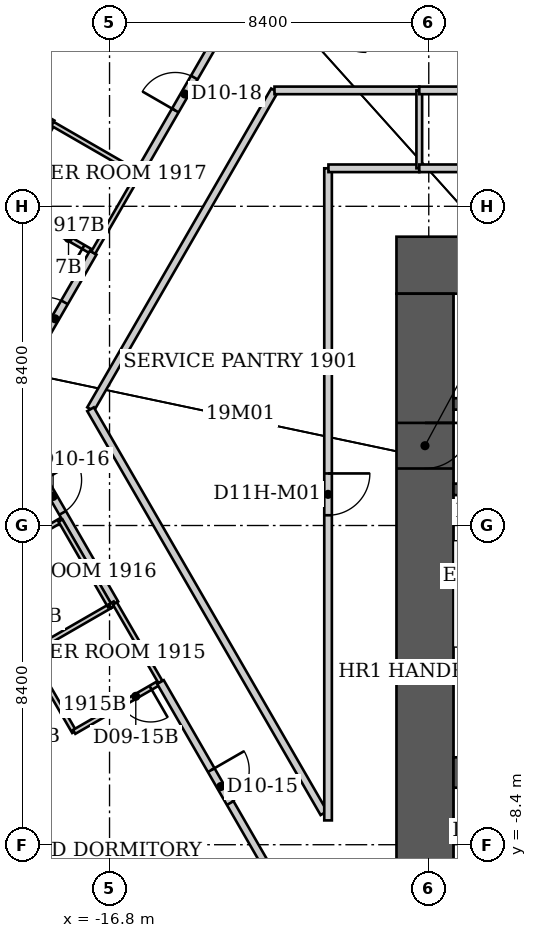
"""IFC4 building model, lengths in metres.
Left out: names, types, materials, properties, quantities, classifications, styles, units other than length and angle.
Written with IfcOpenShell. Run it as: python <this file> out.ifc"""

import sys

from ifc_helpers import new_model, si_unit, direction, frame, frame_2d, origin, origin_2d, place, context, subcontext, project, spatial, rectangle, extrude, element, fill, save


model = new_model("IFC4")
c1 = context("Model", 3, precision=1e-05, world=origin(), true_north=direction((0.0, 1.0)))
c2 = subcontext(c1, "Body", "Model", "MODEL_VIEW")
j1 = project(units=[si_unit("LENGTHUNIT", "METRE"), si_unit("PLANEANGLEUNIT", "RADIAN")], contexts=[c1])
p1 = place(None, origin())
s1 = spatial("IfcSite", under=j1, at=p1, CompositionType="ELEMENT")
p2 = place(p1, origin())
s2 = spatial("IfcBuilding", under=s1, at=p2, CompositionType="ELEMENT")
p3 = place(p2, frame((0.0, 0.0, 80.0)))
s3 = spatial("IfcBuildingStorey", under=s2, at=p3, CompositionType="ELEMENT", Elevation=80.0)
p4 = place(p3, frame((-19.936, -9.169, 0.0), z_axis=(0.033513958168, 0.015408716399, 0.999319461467), x_axis=(-0.865447927191, -0.499650776395, 0.03672855794)))
e1 = element("IfcColumn", 1, at=p4, inside=s3, PredefinedType="COLUMN", context=c2, shape_type="SweptSolid", body=[
    extrude(rectangle(XDim=2.4, YDim=2.4, at=origin_2d()), origin(), (0.0, 0.0, 1.0), 3.803),
])
p5 = place(p3, frame((-9.25, 6.85, 0.0), z_axis=(0.0, 0.0, 1.0), x_axis=(1.0, 0.0, 0.0)))
e2 = element("IfcWall", 2, at=p5, inside=s3, PredefinedType="SHEAR", context=c2, shape_type="SweptSolid", body=[
    extrude(rectangle(XDim=18.5, YDim=1.5, at=frame_2d((9.25, 0.0))), origin(), (0.0, 0.0, 1.0), 3.8),
])
p6 = place(p3, frame((-8.5, -9.2, 0.0), z_axis=(0.0, 0.0, 1.0), x_axis=(0.0, 1.0, 0.0)))
e3 = element("IfcWall", 3, at=p6, inside=s3, PredefinedType="SHEAR", context=c2, shape_type="SweptSolid", body=[
    extrude(rectangle(XDim=15.3, YDim=1.5, at=frame_2d((7.65, 0.0))), origin(), (0.0, 0.0, 1.0), 3.8),
])
p7 = place(p6, frame((10.7, 0.0, 0.0)))
e4 = element("IfcOpeningElement", 4, at=p7, cuts=e3, PredefinedType="OPENING", context=c2, shape_type="SweptSolid", body=[
    extrude(rectangle(XDim=1.2, YDim=2.2, at=frame_2d((0.6, 1.1))), frame((0.0, 0.75, 0.0), z_axis=(0.0, -1.0, 0.0), x_axis=(1.0, 0.0, 0.0)), (0.0, 0.0, 1.0), 1.5),
])
p8 = place(p3, frame((-7.75, -6.5, 0.0), z_axis=(0.0, 0.0, 1.0), x_axis=(1.0, 0.0, 0.0)))
e5 = element("IfcWall", 5, at=p8, inside=s3, PredefinedType="SHEAR", context=c2, shape_type="SweptSolid", body=[
    extrude(rectangle(XDim=15.5, YDim=0.8, at=frame_2d((7.75, 0.0))), origin(), (0.0, 0.0, 1.0), 3.8),
])
p9 = place(p3, frame((-7.75, 0.95, 0.0), z_axis=(0.0, 0.0, 1.0), x_axis=(1.0, 0.0, 0.0)))
e6 = element("IfcWall", 6, at=p9, inside=s3, PredefinedType="SHEAR", context=c2, shape_type="SweptSolid", body=[
    extrude(rectangle(XDim=3.0, YDim=0.3, at=frame_2d((1.5, 0.0))), origin(), (0.0, 0.0, 1.0), 3.8),
])
p10 = place(p9, frame((0.85, 0.0, 0.0)))
e7 = element("IfcOpeningElement", 7, at=p10, cuts=e6, PredefinedType="OPENING", context=c2, shape_type="SweptSolid", body=[
    extrude(rectangle(XDim=1.0, YDim=2.2, at=frame_2d((0.5, 1.1))), frame((0.0, 0.15, 0.0), z_axis=(0.0, -1.0, 0.0), x_axis=(1.0, 0.0, 0.0)), (0.0, 0.0, 1.0), 0.3),
])
p11 = place(p3, frame((-7.75, 3.2, 0.0), z_axis=(0.0, 0.0, 1.0), x_axis=(1.0, 0.0, 0.0)))
e8 = element("IfcWall", 8, at=p11, inside=s3, PredefinedType="SHEAR", context=c2, shape_type="SweptSolid", body=[
    extrude(rectangle(XDim=15.5, YDim=0.3, at=frame_2d((7.75, 0.0))), origin(), (0.0, 0.0, 1.0), 3.8),
])
p12 = place(p11, frame((6.2, 0.0, 0.0)))
e9 = element("IfcOpeningElement", 9, at=p12, cuts=e8, PredefinedType="OPENING", context=c2, shape_type="SweptSolid", body=[
    extrude(rectangle(XDim=1.1, YDim=2.2, at=frame_2d((0.55, 1.1))), frame((0.0, 0.15, 0.0), z_axis=(0.0, -1.0, 0.0), x_axis=(1.0, 0.0, 0.0)), (0.0, 0.0, 1.0), 0.3),
])
p13 = place(p11, frame((9.056, 0.0, 0.0)))
e10 = element("IfcOpeningElement", 10, at=p13, cuts=e8, PredefinedType="OPENING", context=c2, shape_type="SweptSolid", body=[
    extrude(rectangle(XDim=1.1, YDim=2.2, at=frame_2d((0.55, 1.1))), frame((0.0, 0.15, 0.0), z_axis=(0.0, -1.0, 0.0), x_axis=(1.0, 0.0, 0.0)), (0.0, 0.0, 1.0), 0.3),
])
p14 = place(p11, frame((12.681, 0.0, 0.0)))
e11 = element("IfcOpeningElement", 11, at=p14, cuts=e8, PredefinedType="OPENING", context=c2, shape_type="SweptSolid", body=[
    extrude(rectangle(XDim=1.1, YDim=2.2, at=frame_2d((0.55, 1.1))), frame((0.0, 0.15, 0.0), z_axis=(0.0, -1.0, 0.0), x_axis=(1.0, 0.0, 0.0)), (0.0, 0.0, 1.0), 0.3),
])
p15 = place(p3, frame((-25.886, 14.95, 0.0), z_axis=(0.0, 0.0, 1.0), x_axis=(0.866018495177, -0.500011965869, 0.0)))
e12 = element("IfcWall", 12, at=p15, inside=s3, PredefinedType="PARTITIONING", context=c2, shape_type="SweptSolid", body=[
    extrude(rectangle(XDim=8.76, YDim=0.2, at=frame_2d((4.38, 0.0))), origin(), (0.0, 0.0, 1.0), 2.86),
])
p16 = place(p3, frame((-19.61, 3.06, 0.0), z_axis=(0.0, 0.0, 1.0), x_axis=(0.499983910424, -0.866034692906, 0.0)))
e13 = element("IfcWall", 13, at=p16, inside=s3, PredefinedType="PARTITIONING", context=c2, shape_type="SweptSolid", body=[
    extrude(rectangle(XDim=5.901, YDim=0.2, at=frame_2d((2.95, 0.0))), origin(), (0.0, 0.0, 1.0), 3.64),
])
p17 = place(p16, frame((2.15, 0.0, 0.0)))
e14 = element("IfcOpeningElement", 14, at=p17, cuts=e13, PredefinedType="OPENING", context=c2, shape_type="SweptSolid", body=[
    extrude(rectangle(XDim=1.0, YDim=2.13, at=frame_2d((0.5, 1.065))), frame((0.0, 0.1, 0.0), z_axis=(0.0, -1.0, 0.0), x_axis=(1.0, 0.0, 0.0)), (0.0, 0.0, 1.0), 0.2),
])
p18 = place(p3, frame((-19.5, 8.49, 0.0), z_axis=(0.0, 0.0, 1.0), x_axis=(0.866114241029, -0.499846097802, 0.0)))
e15 = element("IfcWall", 15, at=p18, inside=s3, PredefinedType="PARTITIONING", context=c2, shape_type="SweptSolid", body=[
    extrude(rectangle(XDim=2.621, YDim=0.12, at=frame_2d((1.311, 0.0))), origin(), (0.0, 0.0, 1.0), 3.64),
])
p19 = place(p18, frame((1.421, 0.0, 0.0)))
e16 = element("IfcOpeningElement", 16, at=p19, cuts=e15, PredefinedType="OPENING", context=c2, shape_type="SweptSolid", body=[
    extrude(rectangle(XDim=0.9, YDim=2.03, at=frame_2d((0.45, 1.015))), frame((0.0, 0.06, 0.0), z_axis=(0.0, -1.0, 0.0), x_axis=(1.0, 0.0, 0.0)), (0.0, 0.0, 1.0), 0.12),
])
p20 = place(p3, frame((-19.24, 3.7, 0.0), z_axis=(0.0, 0.0, 1.0), x_axis=(0.500157149565, 0.865934654428, 0.0)))
e17 = element("IfcWall", 17, at=p20, inside=s3, PredefinedType="PARTITIONING", context=c2, shape_type="SweptSolid", body=[
    extrude(rectangle(XDim=4.019, YDim=0.2, at=frame_2d((2.009, 0.0))), origin(), (0.0, 0.0, 1.0), 3.64),
])
p21 = place(p20, frame((1.51, 0.0, 0.0)))
e18 = element("IfcOpeningElement", 18, at=p21, cuts=e17, PredefinedType="OPENING", context=c2, shape_type="SweptSolid", body=[
    extrude(rectangle(XDim=1.0, YDim=2.13, at=frame_2d((0.5, 1.065))), frame((0.0, 0.1, 0.0), z_axis=(0.0, -1.0, 0.0), x_axis=(1.0, 0.0, 0.0)), (0.0, 0.0, 1.0), 0.2),
])
p22 = place(p3, frame((-18.93, -3.36, 0.0), z_axis=(0.0, 0.0, 1.0), x_axis=(0.501547039172, -0.865130376012, 0.0)))
e19 = element("IfcWall", 19, at=p22, inside=s3, PredefinedType="PARTITIONING", context=c2, shape_type="SweptSolid", body=[
    extrude(rectangle(XDim=2.393, YDim=0.12, at=frame_2d((1.196, 0.0))), origin(), (0.0, 0.0, 1.0), 3.64),
])
for number, where, z_axis, x_axis in (
    (20, (-18.868, -3.324, 0.0), (0.0, 0.0, 1.0), (0.866, 0.5, 0.0)),
    (21, (-18.3, 10.57, 0.0), (0.0, 0.0, 1.0), (-0.5, -0.866, 0.0)),
):
    element("IfcWall", number, at=place(p3, frame(where, z_axis=z_axis, x_axis=x_axis)), inside=s3, PredefinedType="PARTITIONING", context=c2, shape_type="SweptSolid", body=[
        extrude(rectangle(XDim=2.401, YDim=0.12, at=frame_2d((1.201, 0.0))), origin(), (0.0, 0.0, 1.0), 3.64),
    ])
p23 = place(p3, frame((-18.3, 10.57, 0.0), z_axis=(0.0, 0.0, 1.0), x_axis=(0.866114241029, -0.499846097802, 0.0)))
e22 = element("IfcWall", 22, at=p23, inside=s3, PredefinedType="PARTITIONING", context=c2, shape_type="SweptSolid", body=[
    extrude(rectangle(XDim=2.621, YDim=0.12, at=frame_2d((1.311, 0.0))), origin(), (0.0, 0.0, 1.0), 2.86),
])
p24 = place(p3, frame((-18.09, 0.13, 0.0), z_axis=(0.0, 0.0, 1.0), x_axis=(-0.866177122335, -0.499737123639, 0.0)))
e23 = element("IfcWall", 23, at=p24, inside=s3, PredefinedType="PARTITIONING", context=c2, shape_type="SweptSolid", body=[
    extrude(rectangle(XDim=2.401, YDim=0.12, at=frame_2d((1.201, 0.0))), origin(), (0.0, 0.0, 1.0), 3.64),
])
p25 = place(p3, frame((-17.73, -5.43, 0.0), z_axis=(0.0, 0.0, 1.0), x_axis=(0.866114241029, 0.499846097802, 0.0)))
e24 = element("IfcWall", 24, at=p25, inside=s3, PredefinedType="PARTITIONING", context=c2, shape_type="SweptSolid", body=[
    extrude(rectangle(XDim=2.621, YDim=0.12, at=frame_2d((1.311, 0.0))), origin(), (0.0, 0.0, 1.0), 3.64),
])
p26 = place(p25, frame((1.421, 0.0, 0.0)))
e25 = element("IfcOpeningElement", 25, at=p26, cuts=e24, PredefinedType="OPENING", context=c2, shape_type="SweptSolid", body=[
    extrude(rectangle(XDim=0.9, YDim=2.03, at=frame_2d((0.45, 1.015))), frame((0.0, 0.06, 0.0), z_axis=(0.0, -1.0, 0.0), x_axis=(1.0, 0.0, 0.0)), (0.0, 0.0, 1.0), 0.12),
])
p27 = place(p3, frame((-17.3, 3.06, 0.0), z_axis=(0.0, 0.0, 1.0), x_axis=(0.499704269421, 0.866196076603, 0.0)))
e26 = element("IfcWall", 26, at=p27, inside=s3, PredefinedType="PARTITIONING", context=c2, shape_type="SweptSolid", body=[
    extrude(rectangle(XDim=9.686, YDim=0.2, at=frame_2d((4.843, 0.0))), origin(), (0.0, 0.0, 1.0), 3.64),
])
p28 = place(p3, frame((-17.23, 7.18, 0.0), z_axis=(0.0, 0.0, 1.0), x_axis=(0.500009943768, 0.866019662671, 0.0)))
e27 = element("IfcWall", 27, at=p28, inside=s3, PredefinedType="PARTITIONING", context=c2, shape_type="SweptSolid", body=[
    extrude(rectangle(XDim=2.401, YDim=0.12, at=frame_2d((1.201, 0.0))), origin(), (0.0, 0.0, 1.0), 3.64),
])
p29 = place(p3, frame((-16.79, -2.12, 0.0), z_axis=(0.0, 0.0, 1.0), x_axis=(-0.50025099007, 0.865880446098, 0.0)))
e28 = element("IfcWall", 28, at=p29, inside=s3, PredefinedType="PARTITIONING", context=c2, shape_type="SweptSolid", body=[
    extrude(rectangle(XDim=2.599, YDim=0.12, at=frame_2d((1.299, 0.0))), origin(), (0.0, 0.0, 1.0), 3.64),
])
p30 = place(p3, frame((-16.788, -2.124, 0.0), z_axis=(0.0, 0.0, 1.0), x_axis=(0.866405716731, 0.499340699338, 0.0)))
e29 = element("IfcWall", 29, at=p30, inside=s3, PredefinedType="PARTITIONING", context=c2, shape_type="SweptSolid", body=[
    extrude(rectangle(XDim=0.148, YDim=0.12, at=frame_2d((0.074, 0.0))), origin(), (0.0, 0.0, 1.0), 3.64),
])
p31 = place(p3, frame((-16.66, -2.05, 0.0), z_axis=(0.0, 0.0, 1.0), x_axis=(0.501502765098, -0.865156041763, 0.0)))
e30 = element("IfcWall", 30, at=p31, inside=s3, PredefinedType="PARTITIONING", context=c2, shape_type="SweptSolid", body=[
    extrude(rectangle(XDim=2.393, YDim=0.12, at=frame_2d((1.196, 0.0))), origin(), (0.0, 0.0, 1.0), 3.64),
])
p32 = place(p3, frame((-16.029, 9.26, 0.0), z_axis=(0.0, 0.0, 1.0), x_axis=(0.499975779801, 0.866039386871, 0.0)))
e31 = element("IfcWall", 31, at=p32, inside=s3, PredefinedType="PARTITIONING", context=c2, shape_type="SweptSolid", body=[
    extrude(rectangle(XDim=4.839, YDim=0.2, at=frame_2d((2.419, 0.0))), origin(), (0.0, 0.0, 1.0), 3.64),
])
p33 = place(p32, frame((1.919, 0.0, 0.0)))
e32 = element("IfcOpeningElement", 32, at=p33, cuts=e31, PredefinedType="OPENING", context=c2, shape_type="SweptSolid", body=[
    extrude(rectangle(XDim=1.0, YDim=2.13, at=frame_2d((0.5, 1.065))), frame((0.0, 0.1, 0.0), z_axis=(0.0, -1.0, 0.0), x_axis=(1.0, 0.0, 0.0)), (0.0, 0.0, 1.0), 0.2),
])
p34 = place(p3, frame((-15.46, -4.12, 0.0), z_axis=(0.0, 0.0, 1.0), x_axis=(0.499349514416, -0.866400636226, 0.0)))
e33 = element("IfcWall", 33, at=p34, inside=s3, PredefinedType="PARTITIONING", context=c2, shape_type="SweptSolid", body=[
    extrude(rectangle(XDim=6.348, YDim=0.2, at=frame_2d((3.174, 0.0))), origin(), (0.0, 0.0, 1.0), 3.64),
])
p35 = place(p34, frame((2.674, 0.0, 0.0)))
e34 = element("IfcOpeningElement", 34, at=p35, cuts=e33, PredefinedType="OPENING", context=c2, shape_type="SweptSolid", body=[
    extrude(rectangle(XDim=1.0, YDim=2.13, at=frame_2d((0.5, 1.065))), frame((0.0, 0.1, 0.0), z_axis=(0.0, -1.0, 0.0), x_axis=(1.0, 0.0, 0.0)), (0.0, 0.0, 1.0), 0.2),
])
p36 = place(p3, frame((-12.46, 11.45, 0.0), z_axis=(0.0, 0.0, 1.0), x_axis=(1.0, 0.0, 0.0)))
e35 = element("IfcWall", 35, at=p36, inside=s3, PredefinedType="PARTITIONING", context=c2, shape_type="SweptSolid", body=[
    extrude(rectangle(XDim=3.81, YDim=0.2, at=frame_2d((1.905, 0.0))), origin(), (0.0, 0.0, 1.0), 3.64),
])
p37 = place(p3, frame((-11.16, -7.57, 0.0), z_axis=(0.0, 0.0, 1.0), x_axis=(-0.500175206663, 0.865924224537, 0.0)))
e36 = element("IfcWall", 36, at=p37, inside=s3, PredefinedType="PARTITIONING", context=c2, shape_type="SweptSolid", body=[
    extrude(rectangle(XDim=12.275, YDim=0.2, at=frame_2d((6.138, 0.0))), origin(), (0.0, 0.0, 1.0), 3.64),
])
p38 = place(p3, frame((-11.05, 9.4, 0.0), z_axis=(0.0, 0.0, 1.0), x_axis=(0.0, -1.0, 0.0)))
e37 = element("IfcWall", 37, at=p38, inside=s3, PredefinedType="PARTITIONING", context=c2, shape_type="SweptSolid", body=[
    extrude(rectangle(XDim=17.16, YDim=0.2, at=frame_2d((8.58, 0.0))), origin(), (0.0, 0.0, 1.0), 3.64),
])
p39 = place(p38, frame((8.03, 0.0, 0.0)))
e38 = element("IfcOpeningElement", 38, at=p39, cuts=e37, PredefinedType="OPENING", context=c2, shape_type="SweptSolid", body=[
    extrude(rectangle(XDim=1.1, YDim=2.2, at=frame_2d((0.55, 1.1))), frame((0.0, 0.1, 0.0), z_axis=(0.0, -1.0, 0.0), x_axis=(1.0, 0.0, 0.0)), (0.0, 0.0, 1.0), 0.2),
])
p40 = place(p3, frame((-8.65, 9.4, 0.0), z_axis=(0.0, 0.0, 1.0), x_axis=(-1.0, 0.0, 0.0)))
e39 = element("IfcWall", 39, at=p40, inside=s3, PredefinedType="PARTITIONING", context=c2, shape_type="SweptSolid", body=[
    extrude(rectangle(XDim=2.39, YDim=0.2, at=frame_2d((1.195, 0.0))), origin(), (0.0, 0.0, 1.0), 3.64),
])
p41 = place(p3, frame((-8.65, 11.45, 0.0), z_axis=(0.0, 0.0, 1.0), x_axis=(0.0, -1.0, 0.0)))
e40 = element("IfcWall", 40, at=p41, inside=s3, PredefinedType="PARTITIONING", context=c2, shape_type="SweptSolid", body=[
    extrude(rectangle(XDim=2.05, YDim=0.15, at=frame_2d((1.025, 0.0))), origin(), (0.0, 0.0, 1.0), 3.64),
])
p42 = place(p3, frame((-8.65, 11.45, 0.0), z_axis=(0.0, 0.0, 1.0), x_axis=(1.0, 0.0, 0.0)))
e41 = element("IfcWall", 41, at=p42, inside=s3, PredefinedType="PARTITIONING", context=c2, shape_type="SweptSolid", body=[
    extrude(rectangle(XDim=8.65, YDim=0.2, at=frame_2d((4.325, 0.0))), origin(), (0.0, 0.0, 1.0), 3.64),
])
p43 = place(p42, frame((3.775, 0.0, 0.0)))
e42 = element("IfcOpeningElement", 42, at=p43, cuts=e41, PredefinedType="OPENING", context=c2, shape_type="SweptSolid", body=[
    extrude(rectangle(XDim=1.1, YDim=2.2, at=frame_2d((0.55, 1.1))), frame((0.0, 0.1, 0.0), z_axis=(0.0, -1.0, 0.0), x_axis=(1.0, 0.0, 0.0)), (0.0, 0.0, 1.0), 0.2),
])
p44 = place(p3, frame((0.0, 9.4, 0.0), z_axis=(0.0, 0.0, 1.0), x_axis=(-1.0, 0.0, 0.0)))
e43 = element("IfcWall", 43, at=p44, inside=s3, PredefinedType="PARTITIONING", context=c2, shape_type="SweptSolid", body=[
    extrude(rectangle(XDim=8.65, YDim=0.2, at=frame_2d((4.325, 0.0))), origin(), (0.0, 0.0, 1.0), 3.64),
])
p45 = place(p35, origin())
e44 = element("IfcDoor", 44, at=p45, inside=s3, OperationType="SINGLE_SWING_LEFT", PredefinedType="DOOR", context=c2, shape_type="SweptSolid", body=[
    extrude(rectangle(XDim=1.0, YDim=2.13, at=frame_2d((0.5, 1.065))), frame((0.0, 0.025, 0.0), z_axis=(0.0, -1.0, 0.0), x_axis=(1.0, 0.0, 0.0)), (0.0, 0.0, 1.0), 0.05),
])
fill(e34, e44)
p46 = place(p26, origin())
e45 = element("IfcDoor", 45, at=p46, inside=s3, OperationType="SINGLE_SWING_RIGHT", PredefinedType="DOOR", context=c2, shape_type="SweptSolid", body=[
    extrude(rectangle(XDim=0.9, YDim=2.03, at=frame_2d((0.45, 1.015))), frame((0.0, 0.025, 0.0), z_axis=(0.0, -1.0, 0.0), x_axis=(1.0, 0.0, 0.0)), (0.0, 0.0, 1.0), 0.05),
])
fill(e25, e45)
p47 = place(p17, origin())
e46 = element("IfcDoor", 46, at=p47, inside=s3, OperationType="SINGLE_SWING_LEFT", PredefinedType="DOOR", context=c2, shape_type="SweptSolid", body=[
    extrude(rectangle(XDim=1.0, YDim=2.13, at=frame_2d((0.5, 1.065))), frame((0.0, 0.025, 0.0), z_axis=(0.0, -1.0, 0.0), x_axis=(1.0, 0.0, 0.0)), (0.0, 0.0, 1.0), 0.05),
])
fill(e14, e46)
p48 = place(p21, origin())
e47 = element("IfcDoor", 47, at=p48, inside=s3, OperationType="SINGLE_SWING_LEFT", PredefinedType="DOOR", context=c2, shape_type="SweptSolid", body=[
    extrude(rectangle(XDim=1.0, YDim=2.13, at=frame_2d((0.5, 1.065))), frame((0.0, 0.025, 0.0), z_axis=(0.0, -1.0, 0.0), x_axis=(1.0, 0.0, 0.0)), (0.0, 0.0, 1.0), 0.05),
])
fill(e18, e47)
p49 = place(p19, origin())
e48 = element("IfcDoor", 48, at=p49, inside=s3, OperationType="SINGLE_SWING_RIGHT", PredefinedType="DOOR", context=c2, shape_type="SweptSolid", body=[
    extrude(rectangle(XDim=0.9, YDim=2.03, at=frame_2d((0.45, 1.015))), frame((0.0, 0.025, 0.0), z_axis=(0.0, -1.0, 0.0), x_axis=(1.0, 0.0, 0.0)), (0.0, 0.0, 1.0), 0.05),
])
fill(e16, e48)
p50 = place(p33, origin())
e49 = element("IfcDoor", 49, at=p50, inside=s3, OperationType="SINGLE_SWING_LEFT", PredefinedType="DOOR", context=c2, shape_type="SweptSolid", body=[
    extrude(rectangle(XDim=1.0, YDim=2.13, at=frame_2d((0.5, 1.065))), frame((0.0, 0.025, 0.0), z_axis=(0.0, -1.0, 0.0), x_axis=(1.0, 0.0, 0.0)), (0.0, 0.0, 1.0), 0.05),
])
fill(e32, e49)
p51 = place(p39, origin())
e50 = element("IfcDoor", 50, at=p51, inside=s3, OperationType="SINGLE_SWING_LEFT", PredefinedType="DOOR", context=c2, shape_type="SweptSolid", body=[
    extrude(rectangle(XDim=1.1, YDim=2.2, at=frame_2d((0.55, 1.1))), frame((0.0, 0.025, 0.0), z_axis=(0.0, -1.0, 0.0), x_axis=(1.0, 0.0, 0.0)), (0.0, 0.0, 1.0), 0.05),
])
fill(e38, e50)
p52 = place(p7, origin())
e51 = element("IfcDoor", 51, at=p52, inside=s3, OperationType="SINGLE_SWING_RIGHT", PredefinedType="DOOR", context=c2, shape_type="SweptSolid", body=[
    extrude(rectangle(XDim=1.2, YDim=2.2, at=frame_2d((0.6, 1.1))), frame((0.0, 0.025, 0.0), z_axis=(0.0, -1.0, 0.0), x_axis=(1.0, 0.0, 0.0)), (0.0, 0.0, 1.0), 0.05),
])
fill(e4, e51)
save(model, sys.argv[1])
